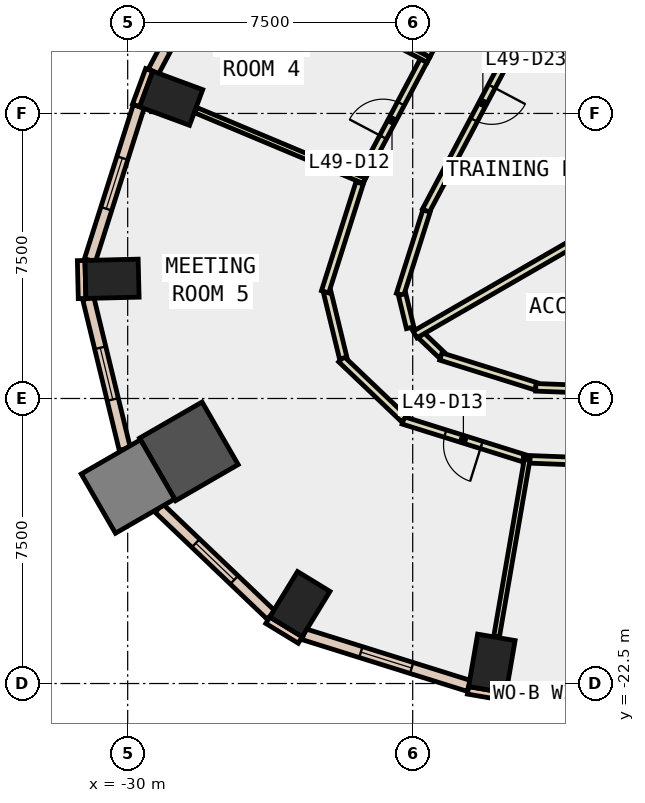
"""IFC4 building model, lengths in metres.
Left out: names, types, materials, properties, quantities, classifications, styles, units other than length and angle.
Written with IfcOpenShell. Run it as: python <this file> out.ifc"""

import sys

from ifc_helpers import new_model, si_unit, direction, frame, frame_2d, origin, origin_2d, place, context, subcontext, project, spatial, rectangle, extrude, element, fill, save


model = new_model("IFC4")
c1 = context("Model", 3, precision=1e-05, world=origin(), true_north=direction((0.0, 1.0)))
c2 = subcontext(c1, "Body", "Model", "MODEL_VIEW")
j1 = project(units=[si_unit("LENGTHUNIT", "METRE"), si_unit("PLANEANGLEUNIT", "RADIAN")], contexts=[c1])
p1 = place(None, origin())
s1 = spatial("IfcSite", under=j1, at=p1, CompositionType="ELEMENT")
p2 = place(p1, origin())
s2 = spatial("IfcBuilding", under=s1, at=p2, CompositionType="ELEMENT")
p3 = place(p2, frame((0.0, 0.0, 219.2)))
s3 = spatial("IfcBuildingStorey", under=s2, at=p3, CompositionType="ELEMENT", Elevation=219.2)
for number, where, z_axis, x_axis in (
    (1, (-20.417, -21.975, -0.4), (0.0, 0.0, 1.0), (-0.986, 0.169, 0.0)),
    (2, (-28.856, -7.1, -0.4), (0.0, 0.0, 1.0), (0.347, 0.938, 0.0)),
    (3, (-30.412, -11.851, -0.4), (0.0, 0.0, 1.0), (-0.025, 1.0, 0.0)),
):
    element("IfcColumn", number, at=place(p3, frame(where, z_axis=z_axis, x_axis=x_axis)), inside=s3, PredefinedType="COLUMN", context=c2, shape_type="SweptSolid", body=[
        extrude(rectangle(XDim=1.0, YDim=1.4, at=origin_2d()), origin(), (0.0, 0.0, 1.0), 4.2),
    ])
p4 = place(p3, frame((-28.39, -16.391, -0.4), z_axis=(0.0, 0.0, 1.0), x_axis=(0.866025403784, 0.5, 0.0)))
e4 = element("IfcColumn", 4, at=p4, inside=s3, PredefinedType="COLUMN", context=c2, shape_type="SweptSolid", body=[
    extrude(rectangle(XDim=1.9, YDim=1.9, at=origin_2d()), origin(), (0.0, 0.0, 1.0), 4.2),
])
p5 = place(p3, frame((-25.469, -20.412, -0.4), z_axis=(0.0, 0.0, 1.0), x_axis=(-0.853423465127, 0.521218178089, 0.0)))
e5 = element("IfcColumn", 5, at=p5, inside=s3, PredefinedType="COLUMN", context=c2, shape_type="SweptSolid", body=[
    extrude(rectangle(XDim=1.0, YDim=1.4, at=origin_2d()), origin(), (0.0, 0.0, 1.0), 4.2),
])
p6 = place(p3, frame((-29.992, -17.316, -0.4), z_axis=(0.0, 0.0, 1.0), x_axis=(0.866025403784, 0.5, 0.0)))
e6 = element("IfcColumn", 6, at=p6, inside=s3, PredefinedType="COLUMN", context=c2, shape_type="SweptSolid", body=[
    extrude(rectangle(XDim=1.8, YDim=1.8, at=origin_2d()), origin(), (0.0, 0.0, 1.0), 4.2),
])
p7 = place(p3, frame((-29.433, -6.354, 0.0), z_axis=(0.0, 0.0, 1.0), x_axis=(-0.346892928577, -0.937904737222, 0.0)))
e7 = element("IfcWall", 7, at=p7, inside=s3, PredefinedType="STANDARD", context=c2, shape_type="SweptSolid", body=[
    extrude(rectangle(XDim=1.0, YDim=0.2, at=frame_2d((0.5, 0.0))), origin(), (0.0, 0.0, 1.0), 3.8),
])
p8 = place(p3, frame((-21.045, -22.679, 0.0), z_axis=(0.0, 0.0, 1.0), x_axis=(0.985631544579, -0.168909615862, 0.0)))
e8 = element("IfcWall", 8, at=p8, inside=s3, PredefinedType="STANDARD", context=c2, shape_type="SweptSolid", body=[
    extrude(rectangle(XDim=1.0, YDim=0.2, at=frame_2d((0.5, 0.0))), origin(), (0.0, 0.0, 1.0), 3.8),
])
p9 = place(p3, frame((-31.224, -11.371, 0.0), z_axis=(0.0, 0.0, 1.0), x_axis=(0.024186470916, -0.999707464524, 0.0)))
e9 = element("IfcWall", 9, at=p9, inside=s3, PredefinedType="STANDARD", context=c2, shape_type="SweptSolid", body=[
    extrude(rectangle(XDim=0.999, YDim=0.2, at=frame_2d((0.5, 0.0))), origin(), (0.0, 0.0, 1.0), 3.8),
])
p10 = place(p3, frame((-26.313, -20.834, 0.0), z_axis=(0.0, 0.0, 1.0), x_axis=(0.853679739553, -0.520798331677, 0.0)))
e10 = element("IfcWall", 10, at=p10, inside=s3, PredefinedType="STANDARD", context=c2, shape_type="SweptSolid", body=[
    extrude(rectangle(XDim=1.0, YDim=0.2, at=frame_2d((0.5, 0.0))), origin(), (0.0, 0.0, 1.0), 3.8),
])
p11 = place(p3, frame((-20.04, -22.732, 0.0), z_axis=(0.0, 0.0, 1.0), x_axis=(0.99926218254, -0.038406907512, 0.0)))
e11 = element("IfcWall", 11, at=p11, inside=s3, PredefinedType="STANDARD", context=c2, shape_type="SweptSolid", body=[
    extrude(rectangle(XDim=5.365, YDim=0.3, at=frame_2d((2.683, 0.0))), origin(), (0.0, 0.0, 1.0), 3.8),
])
p12 = place(p11, frame((0.641, 0.0, 0.9)))
e12 = element("IfcOpeningElement", 12, at=p12, cuts=e11, PredefinedType="OPENING", context=c2, shape_type="SweptSolid", body=[
    extrude(rectangle(XDim=1.4, YDim=2.6, at=frame_2d((0.7, 1.3))), frame((0.0, 0.16, 0.0), z_axis=(0.0, -1.0, 0.0), x_axis=(1.0, 0.0, 0.0)), (0.0, 0.0, 1.0), 0.32),
])
p13 = place(p11, frame((3.324, 0.0, 0.9)))
e13 = element("IfcOpeningElement", 13, at=p13, cuts=e11, PredefinedType="OPENING", context=c2, shape_type="SweptSolid", body=[
    extrude(rectangle(XDim=1.4, YDim=2.6, at=frame_2d((0.7, 1.3))), frame((0.0, 0.16, 0.0), z_axis=(0.0, -1.0, 0.0), x_axis=(1.0, 0.0, 0.0)), (0.0, 0.0, 1.0), 0.32),
])
p14 = place(p3, frame((-25.887, 0.09, 0.0), z_axis=(0.0, 0.0, 1.0), x_axis=(-0.468020680141, -0.8837175131, 0.0)))
e14 = element("IfcWall", 14, at=p14, inside=s3, PredefinedType="STANDARD", context=c2, shape_type="SweptSolid", body=[
    extrude(rectangle(XDim=7.34, YDim=0.3, at=frame_2d((3.67, 0.0))), origin(), (0.0, 0.0, 1.0), 3.8),
])
p15 = place(p14, frame((0.635, 0.0, 0.9)))
e15 = element("IfcOpeningElement", 15, at=p15, cuts=e14, PredefinedType="OPENING", context=c2, shape_type="SweptSolid", body=[
    extrude(rectangle(XDim=2.4, YDim=2.6, at=frame_2d((1.2, 1.3))), frame((0.0, 0.16, 0.0), z_axis=(0.0, -1.0, 0.0), x_axis=(1.0, 0.0, 0.0)), (0.0, 0.0, 1.0), 0.32),
])
p16 = place(p14, frame((4.305, 0.0, 0.9)))
e16 = element("IfcOpeningElement", 16, at=p16, cuts=e14, PredefinedType="OPENING", context=c2, shape_type="SweptSolid", body=[
    extrude(rectangle(XDim=2.4, YDim=2.6, at=frame_2d((1.2, 1.3))), frame((0.0, 0.16, 0.0), z_axis=(0.0, -1.0, 0.0), x_axis=(1.0, 0.0, 0.0)), (0.0, 0.0, 1.0), 0.32),
])
p17 = place(p3, frame((-29.71, -7.316, 0.0), z_axis=(0.0, 0.0, 1.0), x_axis=(-0.302195467572, -0.953245980521, 0.0)))
e17 = element("IfcWall", 17, at=p17, inside=s3, PredefinedType="STANDARD", context=c2, shape_type="SweptSolid", body=[
    extrude(rectangle(XDim=4.249, YDim=0.3, at=frame_2d((2.125, 0.0))), origin(), (0.0, 0.0, 1.0), 3.8),
])
p18 = place(p17, frame((1.424, 0.0, 0.9)))
e18 = element("IfcOpeningElement", 18, at=p18, cuts=e17, PredefinedType="OPENING", context=c2, shape_type="SweptSolid", body=[
    extrude(rectangle(XDim=1.4, YDim=2.6, at=frame_2d((0.7, 1.3))), frame((0.0, 0.16, 0.0), z_axis=(0.0, -1.0, 0.0), x_axis=(1.0, 0.0, 0.0)), (0.0, 0.0, 1.0), 0.32),
])
p19 = place(p3, frame((-31.038, -12.365, 0.0), z_axis=(0.0, 0.0, 1.0), x_axis=(0.235766276378, -0.971809787419, 0.0)))
e19 = element("IfcWall", 19, at=p19, inside=s3, PredefinedType="STANDARD", context=c2, shape_type="SweptSolid", body=[
    extrude(rectangle(XDim=4.077, YDim=0.3, at=frame_2d((2.039, 0.0))), origin(), (0.0, 0.0, 1.0), 3.8),
])
p20 = place(p19, frame((1.338, 0.0, 0.9)))
e20 = element("IfcOpeningElement", 20, at=p20, cuts=e19, PredefinedType="OPENING", context=c2, shape_type="SweptSolid", body=[
    extrude(rectangle(XDim=1.4, YDim=2.6, at=frame_2d((0.7, 1.3))), frame((0.0, 0.16, 0.0), z_axis=(0.0, -1.0, 0.0), x_axis=(1.0, 0.0, 0.0)), (0.0, 0.0, 1.0), 0.32),
])
p21 = place(p3, frame((-29.178, -17.884, 0.0), z_axis=(0.0, 0.0, 1.0), x_axis=(0.723707630873, -0.69010670553, 0.0)))
e21 = element("IfcWall", 21, at=p21, inside=s3, PredefinedType="STANDARD", context=c2, shape_type="SweptSolid", body=[
    extrude(rectangle(XDim=4.076, YDim=0.3, at=frame_2d((2.038, 0.0))), origin(), (0.0, 0.0, 1.0), 3.8),
])
p22 = place(p21, frame((1.338, 0.0, 0.9)))
e22 = element("IfcOpeningElement", 22, at=p22, cuts=e21, PredefinedType="OPENING", context=c2, shape_type="SweptSolid", body=[
    extrude(rectangle(XDim=1.4, YDim=2.6, at=frame_2d((0.7, 1.3))), frame((0.0, 0.16, 0.0), z_axis=(0.0, -1.0, 0.0), x_axis=(1.0, 0.0, 0.0)), (0.0, 0.0, 1.0), 0.32),
])
p23 = place(p3, frame((-25.367, -21.202, 0.0), z_axis=(0.0, 0.0, 1.0), x_axis=(0.954297481837, -0.298858354675, 0.0)))
e23 = element("IfcWall", 23, at=p23, inside=s3, PredefinedType="STANDARD", context=c2, shape_type="SweptSolid", body=[
    extrude(rectangle(XDim=4.551, YDim=0.3, at=frame_2d((2.275, 0.0))), origin(), (0.0, 0.0, 1.0), 3.8),
])
p24 = place(p23, frame((1.575, 0.0, 0.9)))
e24 = element("IfcOpeningElement", 24, at=p24, cuts=e23, PredefinedType="OPENING", context=c2, shape_type="SweptSolid", body=[
    extrude(rectangle(XDim=1.4, YDim=2.6, at=frame_2d((0.7, 1.3))), frame((0.0, 0.16, 0.0), z_axis=(0.0, -1.0, 0.0), x_axis=(1.0, 0.0, 0.0)), (0.0, 0.0, 1.0), 0.32),
])
p25 = place(p3, frame((-19.154, -4.397, 0.0), z_axis=(0.0, 0.0, 1.0), x_axis=(-0.468118749105, -0.883665568378, 0.0)))
e25 = element("IfcWall", 25, at=p25, inside=s3, PredefinedType="PARTITIONING", context=c2, shape_type="SweptSolid", body=[
    extrude(rectangle(XDim=6.409, YDim=0.2, at=frame_2d((3.204, 0.0))), origin(), (0.0, 0.0, 1.0), 3.8),
])
p26 = place(p25, frame((2.704, 0.0, 0.0)))
e26 = element("IfcOpeningElement", 26, at=p26, cuts=e25, PredefinedType="OPENING", context=c2, shape_type="SweptSolid", body=[
    extrude(rectangle(XDim=1.0, YDim=2.1, at=frame_2d((0.5, 1.05))), frame((0.0, 0.11, 0.0), z_axis=(0.0, -1.0, 0.0), x_axis=(1.0, 0.0, 0.0)), (0.0, 0.0, 1.0), 0.22),
])
p27 = place(p3, frame((-22.137, -10.067, 0.0), z_axis=(0.0, 0.0, 1.0), x_axis=(-0.302262657712, -0.953224677478, 0.0)))
e27 = element("IfcWall", 27, at=p27, inside=s3, PredefinedType="PARTITIONING", context=c2, shape_type="SweptSolid", body=[
    extrude(rectangle(XDim=2.303, YDim=0.2, at=frame_2d((1.151, 0.0))), origin(), (0.0, 0.0, 1.0), 3.8),
])
p28 = place(p3, frame((-22.779, -12.264, 0.0), z_axis=(0.0, 0.0, 1.0), x_axis=(0.2356388299, -0.971840697771, 0.0)))
e28 = element("IfcWall", 28, at=p28, inside=s3, PredefinedType="PARTITIONING", context=c2, shape_type="SweptSolid", body=[
    extrude(rectangle(XDim=0.9, YDim=0.2, at=frame_2d((0.45, 0.0))), origin(), (0.0, 0.0, 1.0), 3.8),
])
p29 = place(p3, frame((-22.281, -13.337, 0.0), z_axis=(0.0, 0.0, 1.0), x_axis=(0.723443840005, -0.690383234413, 0.0)))
e29 = element("IfcWall", 29, at=p29, inside=s3, PredefinedType="PARTITIONING", context=c2, shape_type="SweptSolid", body=[
    extrude(rectangle(XDim=0.753, YDim=0.2, at=frame_2d((0.376, 0.0))), origin(), (0.0, 0.0, 1.0), 3.8),
])
p30 = place(p3, frame((-21.759, -13.896, 0.0), z_axis=(0.0, 0.0, 1.0), x_axis=(0.954254371194, -0.298995978328, 0.0)))
e30 = element("IfcWall", 30, at=p30, inside=s3, PredefinedType="PARTITIONING", context=c2, shape_type="SweptSolid", body=[
    extrude(rectangle(XDim=2.622, YDim=0.2, at=frame_2d((1.311, 0.0))), origin(), (0.0, 0.0, 1.0), 3.8),
])
p31 = place(p3, frame((-19.261, -14.706, 0.0), z_axis=(0.0, 0.0, 1.0), x_axis=(0.999262930749, -0.038387435847, 0.0)))
e31 = element("IfcWall", 31, at=p31, inside=s3, PredefinedType="PARTITIONING", context=c2, shape_type="SweptSolid", body=[
    extrude(rectangle(XDim=5.336, YDim=0.2, at=frame_2d((2.668, 0.0))), origin(), (0.0, 0.0, 1.0), 3.8),
])
p32 = place(p31, frame((2.168, 0.0, 0.0)))
e32 = element("IfcOpeningElement", 32, at=p32, cuts=e31, PredefinedType="OPENING", context=c2, shape_type="SweptSolid", body=[
    extrude(rectangle(XDim=1.0, YDim=2.1, at=frame_2d((0.5, 1.05))), frame((0.0, 0.11, 0.0), z_axis=(0.0, -1.0, 0.0), x_axis=(1.0, 0.0, 0.0)), (0.0, 0.0, 1.0), 0.22),
])
p33 = place(p3, frame((-22.14, -5.976, 0.0), z_axis=(0.0, 0.0, 1.0), x_axis=(0.467979143965, 0.883739509592, 0.0)))
e33 = element("IfcWall", 33, at=p33, inside=s3, PredefinedType="PARTITIONING", context=c2, shape_type="SweptSolid", body=[
    extrude(rectangle(XDim=4.049, YDim=0.2, at=frame_2d((2.024, 0.0))), origin(), (0.0, 0.0, 1.0), 3.8),
])
p34 = place(p33, frame((1.524, 0.0, 0.0)))
e34 = element("IfcOpeningElement", 34, at=p34, cuts=e33, PredefinedType="OPENING", context=c2, shape_type="SweptSolid", body=[
    extrude(rectangle(XDim=1.0, YDim=2.1, at=frame_2d((0.5, 1.05))), frame((0.0, 0.11, 0.0), z_axis=(0.0, -1.0, 0.0), x_axis=(1.0, 0.0, 0.0)), (0.0, 0.0, 1.0), 0.22),
])
p35 = place(p3, frame((-23.878, -9.256, 0.0), z_axis=(0.0, 0.0, 1.0), x_axis=(0.46795384568, 0.883752905689, 0.0)))
e35 = element("IfcWall", 35, at=p35, inside=s3, PredefinedType="PARTITIONING", context=c2, shape_type="SweptSolid", body=[
    extrude(rectangle(XDim=3.562, YDim=0.2, at=frame_2d((1.781, 0.0))), origin(), (0.0, 0.0, 1.0), 3.8),
])
p36 = place(p35, frame((1.281, 0.0, 0.0)))
e36 = element("IfcOpeningElement", 36, at=p36, cuts=e35, PredefinedType="OPENING", context=c2, shape_type="SweptSolid", body=[
    extrude(rectangle(XDim=1.0, YDim=2.1, at=frame_2d((0.5, 1.05))), frame((0.0, 0.11, 0.0), z_axis=(0.0, -1.0, 0.0), x_axis=(1.0, 0.0, 0.0)), (0.0, 0.0, 1.0), 0.22),
])
p37 = place(p3, frame((-19.583, -16.569, 0.0), z_axis=(0.0, 0.0, 1.0), x_axis=(-0.954238750745, 0.299045826884, 0.0)))
e37 = element("IfcWall", 37, at=p37, inside=s3, PredefinedType="PARTITIONING", context=c2, shape_type="SweptSolid", body=[
    extrude(rectangle(XDim=3.318, YDim=0.2, at=frame_2d((1.659, 0.0))), origin(), (0.0, 0.0, 1.0), 3.8),
])
p38 = place(p37, frame((1.159, 0.0, 0.0)))
e38 = element("IfcOpeningElement", 38, at=p38, cuts=e37, PredefinedType="OPENING", context=c2, shape_type="SweptSolid", body=[
    extrude(rectangle(XDim=1.0, YDim=2.1, at=frame_2d((0.5, 1.05))), frame((0.0, 0.11, 0.0), z_axis=(0.0, -1.0, 0.0), x_axis=(1.0, 0.0, 0.0)), (0.0, 0.0, 1.0), 0.22),
])
p39 = place(p3, frame((-22.726, -15.538, 0.0), z_axis=(0.0, 0.0, 1.0), x_axis=(-0.723967420116, 0.689834164571, 0.0)))
e39 = element("IfcWall", 39, at=p39, inside=s3, PredefinedType="PARTITIONING", context=c2, shape_type="SweptSolid", body=[
    extrude(rectangle(XDim=2.282, YDim=0.2, at=frame_2d((1.141, 0.0))), origin(), (0.0, 0.0, 1.0), 3.8),
])
p40 = place(p3, frame((-24.329, -13.935, 0.0), z_axis=(0.0, 0.0, 1.0), x_axis=(-0.235756216468, 0.971812227952, 0.0)))
e40 = element("IfcWall", 40, at=p40, inside=s3, PredefinedType="PARTITIONING", context=c2, shape_type="SweptSolid", body=[
    extrude(rectangle(XDim=1.79, YDim=0.2, at=frame_2d((0.895, 0.0))), origin(), (0.0, 0.0, 1.0), 3.8),
])
p41 = place(p3, frame((-24.805, -12.194, 0.0), z_axis=(0.0, 0.0, 1.0), x_axis=(0.302200639646, 0.953244340868, 0.0)))
e41 = element("IfcWall", 41, at=p41, inside=s3, PredefinedType="PARTITIONING", context=c2, shape_type="SweptSolid", body=[
    extrude(rectangle(XDim=3.004, YDim=0.2, at=frame_2d((1.502, 0.0))), origin(), (0.0, 0.0, 1.0), 3.8),
])
p42 = place(p3, frame((-13.988, -16.81, 0.0), z_axis=(0.0, 0.0, 1.0), x_axis=(-0.999263168163, 0.038381255227, 0.0)))
e42 = element("IfcWall", 42, at=p42, inside=s3, PredefinedType="PARTITIONING", context=c2, shape_type="SweptSolid", body=[
    extrude(rectangle(XDim=5.604, YDim=0.2, at=frame_2d((2.802, 0.0))), origin(), (0.0, 0.0, 1.0), 3.8),
])
p43 = place(p42, frame((2.302, 0.0, 0.0)))
e43 = element("IfcOpeningElement", 43, at=p43, cuts=e42, PredefinedType="OPENING", context=c2, shape_type="SweptSolid", body=[
    extrude(rectangle(XDim=1.0, YDim=2.1, at=frame_2d((0.5, 1.05))), frame((0.0, 0.11, 0.0), z_axis=(0.0, -1.0, 0.0), x_axis=(1.0, 0.0, 0.0)), (0.0, 0.0, 1.0), 0.22),
])
p44 = place(p3, frame((-16.525, -9.079, 0.0), z_axis=(0.0, 0.0, 1.0), x_axis=(-0.499943228252, 0.866058178487, 0.0)))
e44 = element("IfcWall", 44, at=p44, inside=s3, PredefinedType="PARTITIONING", context=c2, shape_type="SweptSolid", body=[
    extrude(rectangle(XDim=5.329, YDim=0.15, at=frame_2d((2.664, 0.0))), origin(), (0.0, 0.0, 1.0), 3.8),
])
p45 = place(p3, frame((-16.514, -9.897, 0.0), z_axis=(0.0, 0.0, 1.0), x_axis=(-0.866041209536, -0.499972622635, 0.0)))
e45 = element("IfcWall", 45, at=p45, inside=s3, PredefinedType="PARTITIONING", context=c2, shape_type="SweptSolid", body=[
    extrude(rectangle(XDim=6.843, YDim=0.2, at=frame_2d((3.421, 0.0))), origin(), (0.0, 0.0, 1.0), 3.8),
])
p46 = place(p3, frame((-22.087, -6.089, 0.0), z_axis=(0.0, 0.0, 1.0), x_axis=(-0.883611647524, 0.468220521079, 0.0)))
e46 = element("IfcWall", 46, at=p46, inside=s3, PredefinedType="PARTITIONING", context=c2, shape_type="SweptSolid", body=[
    extrude(rectangle(XDim=6.1, YDim=0.15, at=frame_2d((3.05, 0.0))), origin(), (0.0, 0.0, 1.0), 3.8),
])
p47 = place(p3, frame((-23.774, -9.273, 0.0), z_axis=(0.0, 0.0, 1.0), x_axis=(-0.922217762148, 0.386670918454, 0.0)))
e47 = element("IfcWall", 47, at=p47, inside=s3, PredefinedType="PARTITIONING", context=c2, shape_type="SweptSolid", body=[
    extrude(rectangle(XDim=4.805, YDim=0.15, at=frame_2d((2.402, 0.0))), origin(), (0.0, 0.0, 1.0), 3.8),
])
p48 = place(p3, frame((-19.488, -16.599, 0.0), z_axis=(0.0, 0.0, 1.0), x_axis=(-0.169963884325, -0.985450292011, 0.0)))
e48 = element("IfcWall", 48, at=p48, inside=s3, PredefinedType="PARTITIONING", context=c2, shape_type="SweptSolid", body=[
    extrude(rectangle(XDim=4.736, YDim=0.15, at=frame_2d((2.368, 0.0))), origin(), (0.0, 0.0, 1.0), 3.8),
])
p49 = place(p12, origin())
e49 = element("IfcWindow", 49, at=p49, inside=s3, PartitioningType="SINGLE_PANEL", PredefinedType="WINDOW", context=c2, shape_type="SweptSolid", body=[
    extrude(rectangle(XDim=1.4, YDim=2.6, at=frame_2d((0.7, 1.3))), frame((0.0, 0.03, 0.0), z_axis=(0.0, -1.0, 0.0), x_axis=(1.0, 0.0, 0.0)), (0.0, 0.0, 1.0), 0.06),
])
fill(e12, e49)
p50 = place(p18, origin())
e50 = element("IfcWindow", 50, at=p50, inside=s3, PartitioningType="SINGLE_PANEL", PredefinedType="WINDOW", context=c2, shape_type="SweptSolid", body=[
    extrude(rectangle(XDim=1.4, YDim=2.6, at=frame_2d((0.7, 1.3))), frame((0.0, 0.03, 0.0), z_axis=(0.0, -1.0, 0.0), x_axis=(1.0, 0.0, 0.0)), (0.0, 0.0, 1.0), 0.06),
])
fill(e18, e50)
p51 = place(p20, origin())
e51 = element("IfcWindow", 51, at=p51, inside=s3, PartitioningType="SINGLE_PANEL", PredefinedType="WINDOW", context=c2, shape_type="SweptSolid", body=[
    extrude(rectangle(XDim=1.4, YDim=2.6, at=frame_2d((0.7, 1.3))), frame((0.0, 0.03, 0.0), z_axis=(0.0, -1.0, 0.0), x_axis=(1.0, 0.0, 0.0)), (0.0, 0.0, 1.0), 0.06),
])
fill(e20, e51)
p52 = place(p22, origin())
e52 = element("IfcWindow", 52, at=p52, inside=s3, PartitioningType="SINGLE_PANEL", PredefinedType="WINDOW", context=c2, shape_type="SweptSolid", body=[
    extrude(rectangle(XDim=1.4, YDim=2.6, at=frame_2d((0.7, 1.3))), frame((0.0, 0.03, 0.0), z_axis=(0.0, -1.0, 0.0), x_axis=(1.0, 0.0, 0.0)), (0.0, 0.0, 1.0), 0.06),
])
fill(e22, e52)
p53 = place(p24, origin())
e53 = element("IfcWindow", 53, at=p53, inside=s3, PartitioningType="SINGLE_PANEL", PredefinedType="WINDOW", context=c2, shape_type="SweptSolid", body=[
    extrude(rectangle(XDim=1.4, YDim=2.6, at=frame_2d((0.7, 1.3))), frame((0.0, 0.03, 0.0), z_axis=(0.0, -1.0, 0.0), x_axis=(1.0, 0.0, 0.0)), (0.0, 0.0, 1.0), 0.06),
])
fill(e24, e53)
p54 = place(p36, origin())
e54 = element("IfcDoor", 54, at=p54, inside=s3, OperationType="SINGLE_SWING_LEFT", PredefinedType="DOOR", context=c2, shape_type="SweptSolid", body=[
    extrude(rectangle(XDim=1.0, YDim=2.1, at=frame_2d((0.5, 1.05))), frame((0.0, 0.025, 0.0), z_axis=(0.0, -1.0, 0.0), x_axis=(1.0, 0.0, 0.0)), (0.0, 0.0, 1.0), 0.05),
])
fill(e36, e54)
p55 = place(p38, origin())
e55 = element("IfcDoor", 55, at=p55, inside=s3, OperationType="SINGLE_SWING_RIGHT", PredefinedType="DOOR", context=c2, shape_type="SweptSolid", body=[
    extrude(rectangle(XDim=1.0, YDim=2.1, at=frame_2d((0.5, 1.05))), frame((0.0, 0.025, 0.0), z_axis=(0.0, -1.0, 0.0), x_axis=(1.0, 0.0, 0.0)), (0.0, 0.0, 1.0), 0.05),
])
fill(e38, e55)
p56 = place(p26, origin())
e56 = element("IfcDoor", 56, at=p56, inside=s3, OperationType="SINGLE_SWING_LEFT", PredefinedType="DOOR", context=c2, shape_type="SweptSolid", body=[
    extrude(rectangle(XDim=1.0, YDim=2.1, at=frame_2d((0.5, 1.05))), frame((0.0, 0.025, 0.0), z_axis=(0.0, -1.0, 0.0), x_axis=(1.0, 0.0, 0.0)), (0.0, 0.0, 1.0), 0.05),
])
fill(e26, e56)
save(model, sys.argv[1])
